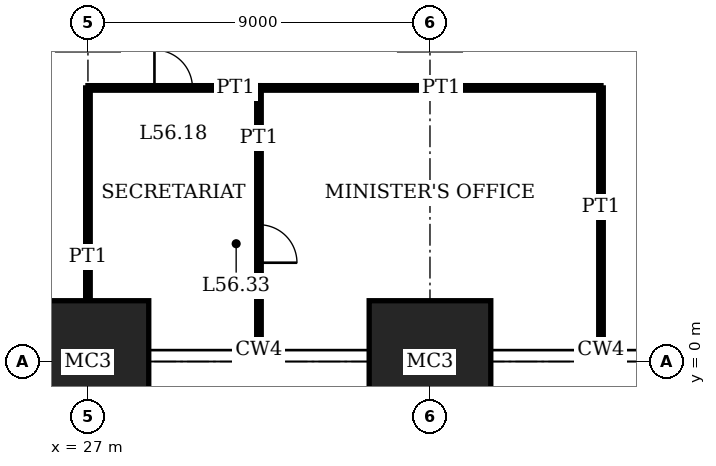
"""IFC4 building model, lengths in metres.
Left out: names, types, materials, properties, quantities, classifications, styles, units other than length and angle.
Written with IfcOpenShell. Run it as: python <this file> out.ifc"""

import sys

from ifc_helpers import new_model, si_unit, direction, frame, frame_2d, origin, origin_2d, place, context, subcontext, project, spatial, rectangle, extrude, element, fill, save


model = new_model("IFC4")
c1 = context("Model", 3, precision=1e-05, world=origin(), true_north=direction((0.0, 1.0)))
c2 = subcontext(c1, "Body", "Model", "MODEL_VIEW")
j1 = project(units=[si_unit("LENGTHUNIT", "METRE"), si_unit("PLANEANGLEUNIT", "RADIAN")], contexts=[c1])
p1 = place(None, origin())
s1 = spatial("IfcSite", under=j1, at=p1, CompositionType="ELEMENT")
p2 = place(p1, origin())
s2 = spatial("IfcBuilding", under=s1, at=p2, CompositionType="ELEMENT")
p3 = place(p2, frame((0.0, 0.0, 230.2)))
s3 = spatial("IfcBuildingStorey", under=s2, at=p3, CompositionType="ELEMENT", Elevation=230.2)
for number, where, z_axis, x_axis in (
    (1, (27.0, 0.0, 0.0), (0.0, 0.0, 1.0), (1.0, 0.0, 0.0)),
    (2, (36.0, 0.0, 0.0), (0.0, 0.0, 1.0), (1.0, 0.0, 0.0)),
):
    element("IfcColumn", number, at=place(p3, frame(where, z_axis=z_axis, x_axis=x_axis)), inside=s3, PredefinedType="COLUMN", context=c2, shape_type="SweptSolid", body=[
        extrude(rectangle(XDim=3.2, YDim=3.2, at=origin_2d()), origin(), (0.0, 0.0, 1.0), 4.2),
    ])
p4 = place(p3, frame((27.0, 7.2, 0.0), z_axis=(0.0, 0.0, 1.0), x_axis=(1.0, 0.0, 0.0)))
e3 = element("IfcWall", 3, at=p4, inside=s3, PredefinedType="PARTITIONING", context=c2, shape_type="SweptSolid", body=[
    extrude(rectangle(XDim=4.5, YDim=0.12, at=frame_2d((2.25, 0.0))), origin(), (0.0, 0.0, 1.0), 3.85),
])
p5 = place(p4, frame((1.75, 0.0, 0.0)))
e4 = element("IfcOpeningElement", 4, at=p5, cuts=e3, PredefinedType="OPENING", context=c2, shape_type="SweptSolid", body=[
    extrude(rectangle(XDim=1.0, YDim=2.4, at=frame_2d((0.5, 1.2))), frame((0.0, 0.07, 0.0), z_axis=(0.0, -1.0, 0.0), x_axis=(1.0, 0.0, 0.0)), (0.0, 0.0, 1.0), 0.14),
])
p6 = place(p3, frame((31.5, 7.2, 0.0), z_axis=(0.0, 0.0, 1.0), x_axis=(1.0, 0.0, 0.0)))
e5 = element("IfcWall", 5, at=p6, inside=s3, PredefinedType="PARTITIONING", context=c2, shape_type="SweptSolid", body=[
    extrude(rectangle(XDim=9.0, YDim=0.12, at=frame_2d((4.5, 0.0))), origin(), (0.0, 0.0, 1.0), 3.85),
])
p7 = place(p3, frame((27.0, 1.6, 0.0), z_axis=(0.0, 0.0, 1.0), x_axis=(0.0, 1.0, 0.0)))
e6 = element("IfcWall", 6, at=p7, inside=s3, PredefinedType="PARTITIONING", context=c2, shape_type="SweptSolid", body=[
    extrude(rectangle(XDim=5.6, YDim=0.12, at=frame_2d((2.8, 0.0))), origin(), (0.0, 0.0, 1.0), 3.25),
])
p8 = place(p3, frame((31.5, 0.31, 0.0), z_axis=(0.0, 0.0, 1.0), x_axis=(0.0, 1.0, 0.0)))
e7 = element("IfcWall", 7, at=p8, inside=s3, PredefinedType="PARTITIONING", context=c2, shape_type="SweptSolid", body=[
    extrude(rectangle(XDim=6.89, YDim=0.12, at=frame_2d((3.445, 0.0))), origin(), (0.0, 0.0, 1.0), 3.85),
])
p9 = place(p8, frame((2.29, 0.0, 0.0)))
e8 = element("IfcOpeningElement", 8, at=p9, cuts=e7, PredefinedType="OPENING", context=c2, shape_type="SweptSolid", body=[
    extrude(rectangle(XDim=1.0, YDim=2.4, at=frame_2d((0.5, 1.2))), frame((0.0, 0.07, 0.0), z_axis=(0.0, -1.0, 0.0), x_axis=(1.0, 0.0, 0.0)), (0.0, 0.0, 1.0), 0.14),
])
p10 = place(p3, frame((40.5, 0.31, 0.0), z_axis=(0.0, 0.0, 1.0), x_axis=(0.0, 1.0, 0.0)))
e9 = element("IfcWall", 9, at=p10, inside=s3, PredefinedType="PARTITIONING", context=c2, shape_type="SweptSolid", body=[
    extrude(rectangle(XDim=6.89, YDim=0.12, at=frame_2d((3.445, 0.0))), origin(), (0.0, 0.0, 1.0), 3.85),
])
p11 = place(p5, origin())
e10 = element("IfcDoor", 10, at=p11, inside=s3, OperationType="SINGLE_SWING_RIGHT", PredefinedType="DOOR", context=c2, shape_type="SweptSolid", body=[
    extrude(rectangle(XDim=1.0, YDim=2.4, at=frame_2d((0.5, 1.2))), frame((0.0, 0.025, 0.0), z_axis=(0.0, -1.0, 0.0), x_axis=(1.0, 0.0, 0.0)), (0.0, 0.0, 1.0), 0.05),
])
fill(e4, e10)
p12 = place(p9, origin())
e11 = element("IfcDoor", 11, at=p12, inside=s3, OperationType="SINGLE_SWING_LEFT", PredefinedType="DOOR", context=c2, shape_type="SweptSolid", body=[
    extrude(rectangle(XDim=1.0, YDim=2.4, at=frame_2d((0.5, 1.2))), frame((0.0, 0.025, 0.0), z_axis=(0.0, -1.0, 0.0), x_axis=(1.0, 0.0, 0.0)), (0.0, 0.0, 1.0), 0.05),
])
fill(e8, e11)
save(model, sys.argv[1])
